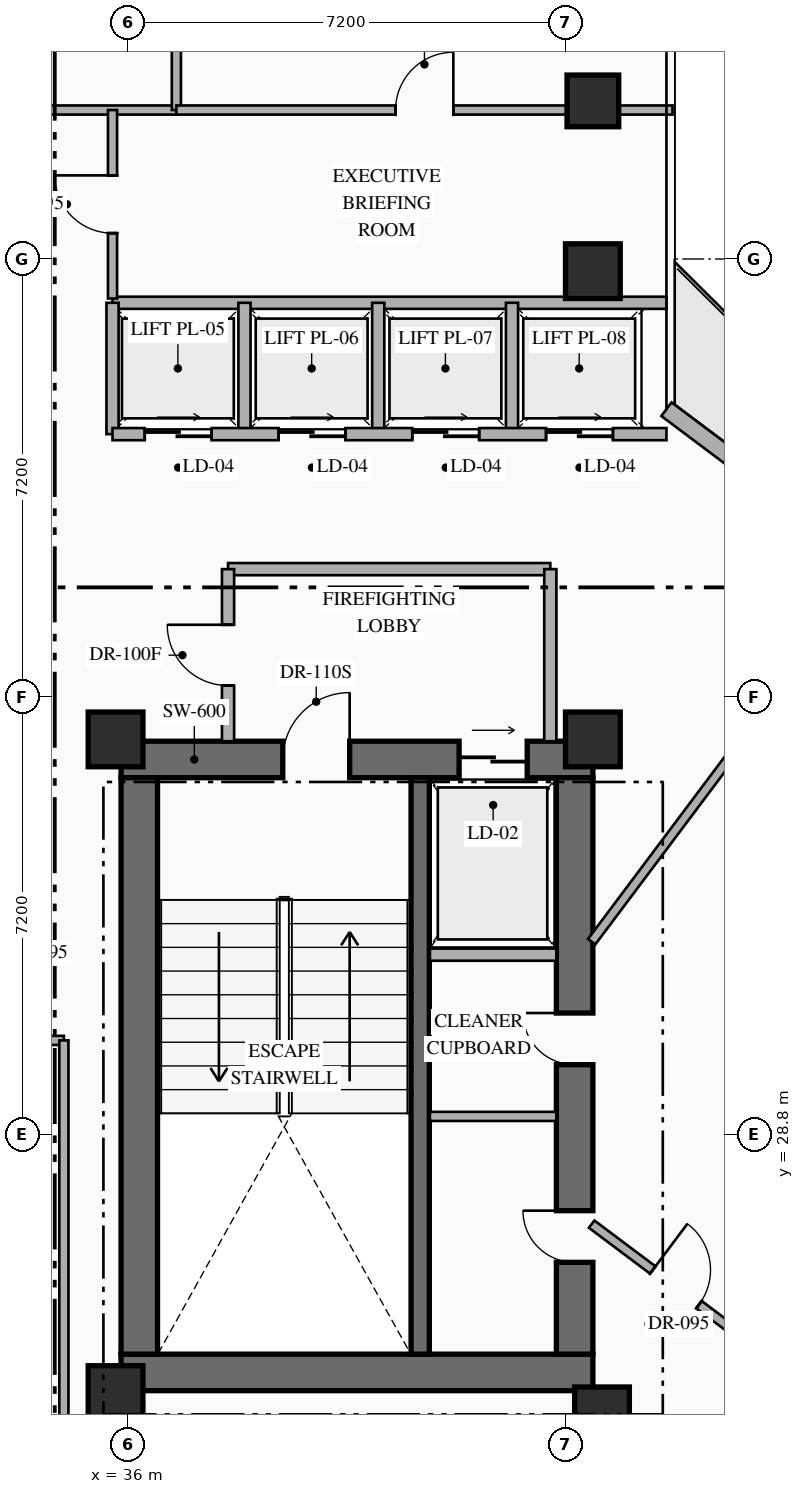
"""IFC4 building model, lengths in metres.
Left out: names, types, materials, properties, quantities, classifications, styles, units other than length and angle.
Written with IfcOpenShell. Run it as: python <this file> out.ifc"""

import sys

from ifc_helpers import new_model, si_unit, direction, frame, frame_2d, origin, origin_2d, place, context, subcontext, project, spatial, rectangle, hollow_rectangle, extrude, element, fill, save


model = new_model("IFC4")
c1 = context("Model", 3, precision=1e-05, world=origin(), true_north=direction((0.0, 1.0)))
c2 = subcontext(c1, "Body", "Model", "MODEL_VIEW")
j1 = project(units=[si_unit("LENGTHUNIT", "METRE"), si_unit("PLANEANGLEUNIT", "RADIAN")], contexts=[c1])
p1 = place(None, origin())
s1 = spatial("IfcSite", under=j1, at=p1, CompositionType="ELEMENT")
p2 = place(p1, origin())
s2 = spatial("IfcBuilding", under=s1, at=p2, CompositionType="ELEMENT")
p3 = place(p2, frame((0.0, 0.0, 142.05)))
s3 = spatial("IfcBuildingStorey", under=s2, at=p3, CompositionType="ELEMENT", Elevation=142.05)
p4 = place(p3, frame((35.89, 24.89, 0.0), z_axis=(0.0, 0.0, 1.0), x_axis=(1.0, 0.0, 0.0)))
e1 = element("IfcWall", 1, at=p4, inside=s3, PredefinedType="SHEAR", context=c2, shape_type="SweptSolid", body=[
    extrude(rectangle(XDim=7.76, YDim=0.6, at=frame_2d((3.88, 0.0))), origin(), (0.0, 0.0, 1.0), 3.6),
])
p5 = place(p3, frame((35.89, 34.97, 0.0), z_axis=(0.0, 0.0, 1.0), x_axis=(1.0, 0.0, 0.0)))
e2 = element("IfcWall", 2, at=p5, inside=s3, PredefinedType="SHEAR", context=c2, shape_type="SweptSolid", body=[
    extrude(rectangle(XDim=7.76, YDim=0.6, at=frame_2d((3.88, 0.0))), origin(), (0.0, 0.0, 1.0), 3.6),
])
p6 = place(p5, frame((2.66, 0.0, 0.0)))
e3 = element("IfcOpeningElement", 3, at=p6, cuts=e2, PredefinedType="OPENING", context=c2, shape_type="SweptSolid", body=[
    extrude(rectangle(XDim=1.1, YDim=2.2, at=frame_2d((0.55, 1.1))), frame((0.0, 0.31, 0.0), z_axis=(0.0, -1.0, 0.0), x_axis=(1.0, 0.0, 0.0)), (0.0, 0.0, 1.0), 0.62),
])
p7 = place(p5, frame((5.56, 0.0, 0.0)))
e4 = element("IfcOpeningElement", 4, at=p7, cuts=e2, PredefinedType="OPENING", context=c2, shape_type="SweptSolid", body=[
    extrude(rectangle(XDim=1.12, YDim=2.15, at=frame_2d((0.56, 1.075))), frame((0.0, 0.31, 0.0), z_axis=(0.0, -1.0, 0.0), x_axis=(1.0, 0.0, 0.0)), (0.0, 0.0, 1.0), 0.62),
])
p8 = place(p3, frame((36.19, 25.19, 0.0), z_axis=(0.0, 0.0, 1.0), x_axis=(0.0, 1.0, 0.0)))
e5 = element("IfcWall", 5, at=p8, inside=s3, PredefinedType="SHEAR", context=c2, shape_type="SweptSolid", body=[
    extrude(rectangle(XDim=9.48, YDim=0.6, at=frame_2d((4.74, 0.0))), origin(), (0.0, 0.0, 1.0), 3.6),
])
p9 = place(p3, frame((43.35, 25.19, 0.0), z_axis=(0.0, 0.0, 1.0), x_axis=(0.0, 1.0, 0.0)))
e6 = element("IfcWall", 6, at=p9, inside=s3, PredefinedType="SHEAR", context=c2, shape_type="SweptSolid", body=[
    extrude(rectangle(XDim=9.48, YDim=0.6, at=frame_2d((4.74, 0.0))), origin(), (0.0, 0.0, 1.0), 3.6),
])
p10 = place(p9, frame((1.51, 0.0, 0.0)))
e7 = element("IfcOpeningElement", 7, at=p10, cuts=e6, PredefinedType="OPENING", context=c2, shape_type="SweptSolid", body=[
    extrude(rectangle(XDim=0.85, YDim=2.08, at=frame_2d((0.425, 1.04))), frame((0.0, 0.31, 0.0), z_axis=(0.0, -1.0, 0.0), x_axis=(1.0, 0.0, 0.0)), (0.0, 0.0, 1.0), 0.62),
])
p11 = place(p9, frame((4.76, 0.0, 0.0)))
e8 = element("IfcOpeningElement", 8, at=p11, cuts=e6, PredefinedType="OPENING", context=c2, shape_type="SweptSolid", body=[
    extrude(rectangle(XDim=0.85, YDim=2.08, at=frame_2d((0.425, 1.04))), frame((0.0, 0.31, 0.0), z_axis=(0.0, -1.0, 0.0), x_axis=(1.0, 0.0, 0.0)), (0.0, 0.0, 1.0), 0.62),
])
p12 = place(p3, frame((40.81, 25.19, 0.0), z_axis=(0.0, 0.0, 1.0), x_axis=(0.0, 1.0, 0.0)))
e9 = element("IfcWall", 9, at=p12, inside=s3, PredefinedType="SHEAR", context=c2, shape_type="SweptSolid", body=[
    extrude(rectangle(XDim=9.48, YDim=0.3, at=frame_2d((4.74, 0.0))), origin(), (0.0, 0.0, 1.0), 3.6),
])
for number, where, z_axis, x_axis in (
    (10, (35.8, 24.55, 0.0), (0.0, 0.0, 1.0), (1.0, 0.0, 0.0)),
    (11, (43.8, 24.2, 0.0), (0.0, 0.0, 1.0), (1.0, 0.0, 0.0)),
    (12, (35.8, 35.3, 0.0), (0.0, 0.0, 1.0), (1.0, 0.0, 0.0)),
    (13, (43.65, 35.3, 0.0), (0.0, 0.0, 1.0), (1.0, 0.0, 0.0)),
    (14, (43.65, 43.0, 0.0), (0.0, 0.0, 1.0), (1.0, 0.0, 0.0)),
):
    element("IfcColumn", number, at=place(p3, frame(where, z_axis=z_axis, x_axis=x_axis)), inside=s3, PredefinedType="COLUMN", context=c2, shape_type="SweptSolid", body=[
        extrude(rectangle(XDim=0.9, YDim=0.9, at=origin_2d()), origin(), (0.0, 0.0, 1.0), 3.6),
    ])
p13 = place(p3, frame((43.65, 45.8, 0.0), z_axis=(0.0, 0.0, 1.0), x_axis=(1.0, 0.0, 0.0)))
e15 = element("IfcColumn", 15, at=p13, inside=s3, PredefinedType="COLUMN", context=c2, shape_type="SweptSolid", body=[
    extrude(hollow_rectangle(XDim=0.85, YDim=0.85, WallThickness=0.032, at=origin_2d()), origin(), (0.0, 0.0, 1.0), 3.6),
])
p14 = place(p3, frame((44.86, 40.73, 0.0), z_axis=(0.0, 0.0, 1.0), x_axis=(0.800007624502, -0.599989833863, 0.0)))
e16 = element("IfcWall", 16, at=p14, inside=s3, PredefinedType="STANDARD", context=c2, shape_type="SweptSolid", body=[
    extrude(rectangle(XDim=19.212, YDim=0.28, at=frame_2d((9.606, 0.0))), origin(), (0.0, 0.0, 1.0), 3.35),
])
p15 = place(p14, frame((1.755, 0.0, 0.0)))
e17 = element("IfcOpeningElement", 17, at=p15, cuts=e16, PredefinedType="OPENING", context=c2, shape_type="SweptSolid", body=[
    extrude(rectangle(XDim=1.1, YDim=2.2, at=frame_2d((0.55, 1.1))), frame((0.0, 0.15, 0.0), z_axis=(0.0, -1.0, 0.0), x_axis=(1.0, 0.0, 0.0)), (0.0, 0.0, 1.0), 0.3),
])
p16 = place(p14, frame((13.509, 0.0, 0.85)))
e18 = element("IfcOpeningElement", 18, at=p16, cuts=e16, PredefinedType="OPENING", context=c2, shape_type="SweptSolid", body=[
    extrude(rectangle(XDim=1.8, YDim=2.1, at=frame_2d((0.9, 1.05))), frame((0.0, 0.15, 0.0), z_axis=(0.0, -1.0, 0.0), x_axis=(1.0, 0.0, 0.0)), (0.0, 0.0, 1.0), 0.3),
])
p17 = place(p3, frame((40.97, 31.76, 0.0), z_axis=(0.0, 0.0, 1.0), x_axis=(1.0, 0.0, 0.0)))
e19 = element("IfcWall", 19, at=p17, inside=s3, PredefinedType="STANDARD", context=c2, shape_type="SweptSolid", body=[
    extrude(rectangle(XDim=2.08, YDim=0.2, at=frame_2d((1.04, 0.0))), origin(), (0.0, 0.0, 1.0), 3.35),
])
p18 = place(p3, frame((40.97, 29.1, 0.0), z_axis=(0.0, 0.0, 1.0), x_axis=(1.0, 0.0, 0.0)))
e20 = element("IfcWall", 20, at=p18, inside=s3, PredefinedType="PARTITIONING", context=c2, shape_type="SweptSolid", body=[
    extrude(rectangle(XDim=2.08, YDim=0.15, at=frame_2d((1.04, 0.0))), origin(), (0.0, 0.0, 1.0), 3.35),
])
p19 = place(p3, frame((37.65, 38.1, 0.0), z_axis=(0.0, 0.0, 1.0), x_axis=(1.0, 0.0, 0.0)))
e21 = element("IfcWall", 21, at=p19, inside=s3, PredefinedType="STANDARD", context=c2, shape_type="SweptSolid", body=[
    extrude(rectangle(XDim=5.3, YDim=0.2, at=frame_2d((2.65, 0.0))), origin(), (0.0, 0.0, 1.0), 3.35),
])
p20 = place(p3, frame((42.95, 35.27, 0.0), z_axis=(0.0, 0.0, 1.0), x_axis=(0.0, 1.0, 0.0)))
e22 = element("IfcWall", 22, at=p20, inside=s3, PredefinedType="STANDARD", context=c2, shape_type="SweptSolid", body=[
    extrude(rectangle(XDim=2.83, YDim=0.2, at=frame_2d((1.415, 0.0))), origin(), (0.0, 0.0, 1.0), 3.35),
])
p21 = place(p3, frame((37.65, 35.27, 0.0), z_axis=(0.0, 0.0, 1.0), x_axis=(0.0, 1.0, 0.0)))
e23 = element("IfcWall", 23, at=p21, inside=s3, PredefinedType="STANDARD", context=c2, shape_type="SweptSolid", body=[
    extrude(rectangle(XDim=2.83, YDim=0.2, at=frame_2d((1.415, 0.0))), origin(), (0.0, 0.0, 1.0), 3.35),
])
p22 = place(p21, frame((0.915, 0.0, 0.0)))
e24 = element("IfcOpeningElement", 24, at=p22, cuts=e23, PredefinedType="OPENING", context=c2, shape_type="SweptSolid", body=[
    extrude(rectangle(XDim=1.0, YDim=2.2, at=frame_2d((0.5, 1.1))), frame((0.0, 0.11, 0.0), z_axis=(0.0, -1.0, 0.0), x_axis=(1.0, 0.0, 0.0)), (0.0, 0.0, 1.0), 0.22),
])
p23 = place(p3, frame((35.75, 42.48, 0.0), z_axis=(0.0, 0.0, 1.0), x_axis=(1.0, 0.0, 0.0)))
e25 = element("IfcWall", 25, at=p23, inside=s3, PredefinedType="STANDARD", context=c2, shape_type="SweptSolid", body=[
    extrude(rectangle(XDim=9.11, YDim=0.2, at=frame_2d((4.555, 0.0))), origin(), (0.0, 0.0, 1.0), 3.35),
])
for number, where, z_axis, x_axis in (
    (26, (35.75, 40.32, 0.0), (0.0, 0.0, 1.0), (0.0, 1.0, 0.0)),
    (27, (37.92, 40.32, 0.0), (0.0, 0.0, 1.0), (0.0, 1.0, 0.0)),
    (28, (40.12, 40.32, 0.0), (0.0, 0.0, 1.0), (0.0, 1.0, 0.0)),
    (29, (42.32, 40.32, 0.0), (0.0, 0.0, 1.0), (0.0, 1.0, 0.0)),
):
    element("IfcWall", number, at=place(p3, frame(where, z_axis=z_axis, x_axis=x_axis)), inside=s3, PredefinedType="STANDARD", context=c2, shape_type="SweptSolid", body=[
        extrude(rectangle(XDim=2.16, YDim=0.2, at=frame_2d((1.08, 0.0))), origin(), (0.0, 0.0, 1.0), 3.35),
    ])
p24 = place(p3, frame((35.75, 40.32, 0.0), z_axis=(0.0, 0.0, 1.0), x_axis=(1.0, 0.0, 0.0)))
e30 = element("IfcWall", 30, at=p24, inside=s3, PredefinedType="STANDARD", context=c2, shape_type="SweptSolid", body=[
    extrude(rectangle(XDim=9.11, YDim=0.2, at=frame_2d((4.555, 0.0))), origin(), (0.0, 0.0, 1.0), 3.35),
])
p25 = place(p24, frame((0.53, 0.0, 0.0)))
e31 = element("IfcOpeningElement", 31, at=p25, cuts=e30, PredefinedType="OPENING", context=c2, shape_type="SweptSolid", body=[
    extrude(rectangle(XDim=1.1, YDim=2.18, at=frame_2d((0.55, 1.09))), frame((0.0, 0.11, 0.0), z_axis=(0.0, -1.0, 0.0), x_axis=(1.0, 0.0, 0.0)), (0.0, 0.0, 1.0), 0.22),
])
p26 = place(p24, frame((2.73, 0.0, 0.0)))
e32 = element("IfcOpeningElement", 32, at=p26, cuts=e30, PredefinedType="OPENING", context=c2, shape_type="SweptSolid", body=[
    extrude(rectangle(XDim=1.1, YDim=2.18, at=frame_2d((0.55, 1.09))), frame((0.0, 0.11, 0.0), z_axis=(0.0, -1.0, 0.0), x_axis=(1.0, 0.0, 0.0)), (0.0, 0.0, 1.0), 0.22),
])
p27 = place(p24, frame((4.93, 0.0, 0.0)))
e33 = element("IfcOpeningElement", 33, at=p27, cuts=e30, PredefinedType="OPENING", context=c2, shape_type="SweptSolid", body=[
    extrude(rectangle(XDim=1.1, YDim=2.18, at=frame_2d((0.55, 1.09))), frame((0.0, 0.11, 0.0), z_axis=(0.0, -1.0, 0.0), x_axis=(1.0, 0.0, 0.0)), (0.0, 0.0, 1.0), 0.22),
])
p28 = place(p24, frame((7.13, 0.0, 0.0)))
e34 = element("IfcOpeningElement", 34, at=p28, cuts=e30, PredefinedType="OPENING", context=c2, shape_type="SweptSolid", body=[
    extrude(rectangle(XDim=1.1, YDim=2.18, at=frame_2d((0.55, 1.09))), frame((0.0, 0.11, 0.0), z_axis=(0.0, -1.0, 0.0), x_axis=(1.0, 0.0, 0.0)), (0.0, 0.0, 1.0), 0.22),
])
p29 = place(p3, frame((30.5, 30.35, 0.0), z_axis=(0.0, 0.0, 1.0), x_axis=(1.0, 0.0, 0.0)))
e35 = element("IfcWall", 35, at=p29, inside=s3, PredefinedType="PARTITIONING", context=c2, shape_type="SweptSolid", body=[
    extrude(rectangle(XDim=4.45, YDim=0.15, at=frame_2d((2.225, 0.0))), origin(), (0.0, 0.0, 1.0), 3.35),
])
p30 = place(p29, frame((2.846, 0.0, 0.0)))
e36 = element("IfcOpeningElement", 36, at=p30, cuts=e35, PredefinedType="OPENING", context=c2, shape_type="SweptSolid", body=[
    extrude(rectangle(XDim=0.95, YDim=2.15, at=frame_2d((0.475, 1.075))), frame((0.0, 0.085, 0.0), z_axis=(0.0, -1.0, 0.0), x_axis=(1.0, 0.0, 0.0)), (0.0, 0.0, 1.0), 0.17),
])
p31 = place(p3, frame((34.95, 23.2, 0.0), z_axis=(0.0, 0.0, 1.0), x_axis=(0.0, 1.0, 0.0)))
e37 = element("IfcWall", 37, at=p31, inside=s3, PredefinedType="PARTITIONING", context=c2, shape_type="SweptSolid", body=[
    extrude(rectangle(XDim=7.15, YDim=0.15, at=frame_2d((3.575, 0.0))), origin(), (0.0, 0.0, 1.0), 3.35),
])
p32 = place(p3, frame((28.4, 45.65, 0.0), z_axis=(0.0, 0.0, 1.0), x_axis=(1.0, 0.0, 0.0)))
e38 = element("IfcWall", 38, at=p32, inside=s3, PredefinedType="PARTITIONING", context=c2, shape_type="SweptSolid", body=[
    extrude(rectangle(XDim=8.4, YDim=0.15, at=frame_2d((4.2, 0.0))), origin(), (0.0, 0.0, 1.0), 2.695),
])
p33 = place(p32, frame((2.052, 0.0, 0.0)))
e39 = element("IfcOpeningElement", 39, at=p33, cuts=e38, PredefinedType="OPENING", context=c2, shape_type="SweptSolid", body=[
    extrude(rectangle(XDim=0.95, YDim=2.15, at=frame_2d((0.475, 1.075))), frame((0.0, 0.085, 0.0), z_axis=(0.0, -1.0, 0.0), x_axis=(1.0, 0.0, 0.0)), (0.0, 0.0, 1.0), 0.17),
])
p34 = place(p3, frame((36.8, 45.65, 0.0), z_axis=(0.0, 0.0, 1.0), x_axis=(0.0, 1.0, 0.0)))
e40 = element("IfcWall", 40, at=p34, inside=s3, PredefinedType="PARTITIONING", context=c2, shape_type="SweptSolid", body=[
    extrude(rectangle(XDim=4.71, YDim=0.15, at=frame_2d((2.355, 0.0))), origin(), (0.0, 0.0, 1.0), 3.35),
])
p35 = place(p3, frame((36.8, 45.65, 0.0), z_axis=(0.0, 0.0, 1.0), x_axis=(1.0, 0.0, 0.0)))
e41 = element("IfcWall", 41, at=p35, inside=s3, PredefinedType="PARTITIONING", context=c2, shape_type="SweptSolid", body=[
    extrude(rectangle(XDim=8.16, YDim=0.15, at=frame_2d((4.08, 0.0))), origin(), (0.0, 0.0, 1.0), 2.695),
])
p36 = place(p35, frame((3.605, 0.0, 0.0)))
e42 = element("IfcOpeningElement", 42, at=p36, cuts=e41, PredefinedType="OPENING", context=c2, shape_type="SweptSolid", body=[
    extrude(rectangle(XDim=0.95, YDim=2.15, at=frame_2d((0.475, 1.075))), frame((0.0, 0.085, 0.0), z_axis=(0.0, -1.0, 0.0), x_axis=(1.0, 0.0, 0.0)), (0.0, 0.0, 1.0), 0.17),
])
p37 = place(p3, frame((45.32, 22.56, 0.0), z_axis=(0.0, 0.0, 1.0), x_axis=(0.6, 0.8, 0.0)))
e43 = element("IfcWall", 43, at=p37, inside=s3, PredefinedType="PARTITIONING", context=c2, shape_type="SweptSolid", body=[
    extrude(rectangle(XDim=7.4, YDim=0.15, at=frame_2d((3.7, 0.0))), origin(), (0.0, 0.0, 1.0), 3.35),
])
p38 = place(p37, frame((3.51, 0.0, 0.0)))
e44 = element("IfcOpeningElement", 44, at=p38, cuts=e43, PredefinedType="OPENING", context=c2, shape_type="SweptSolid", body=[
    extrude(rectangle(XDim=0.95, YDim=2.15, at=frame_2d((0.475, 1.075))), frame((0.0, 0.085, 0.0), z_axis=(0.0, -1.0, 0.0), x_axis=(1.0, 0.0, 0.0)), (0.0, 0.0, 1.0), 0.17),
])
p39 = place(p3, frame((43.63, 27.328, 0.0), z_axis=(0.0, 0.0, 1.0), x_axis=(0.799972182084, -0.600037088764, 0.0)))
e45 = element("IfcWall", 45, at=p39, inside=s3, PredefinedType="PARTITIONING", context=c2, shape_type="SweptSolid", body=[
    extrude(rectangle(XDim=4.213, YDim=0.15, at=frame_2d((2.106, 0.0))), origin(), (0.0, 0.0, 1.0), 3.045),
])
p40 = place(p39, frame((1.256, 0.0, 0.0)))
e46 = element("IfcOpeningElement", 46, at=p40, cuts=e45, PredefinedType="OPENING", context=c2, shape_type="SweptSolid", body=[
    extrude(rectangle(XDim=0.95, YDim=2.15, at=frame_2d((0.475, 1.075))), frame((0.0, 0.085, 0.0), z_axis=(0.0, -1.0, 0.0), x_axis=(1.0, 0.0, 0.0)), (0.0, 0.0, 1.0), 0.17),
])
p41 = place(p3, frame((43.63, 31.973, 0.0), z_axis=(0.0, 0.0, 1.0), x_axis=(0.599975099311, 0.800018674911, 0.0)))
e47 = element("IfcWall", 47, at=p41, inside=s3, PredefinedType="PARTITIONING", context=c2, shape_type="SweptSolid", body=[
    extrude(rectangle(XDim=7.844, YDim=0.15, at=frame_2d((3.922, 0.0))), origin(), (0.0, 0.0, 1.0), 3.35),
])
p42 = place(p3, frame((35.75, 42.55, 0.0), z_axis=(0.0, 0.0, 1.0), x_axis=(0.0, 1.0, 0.0)))
e48 = element("IfcWall", 48, at=p42, inside=s3, PredefinedType="PARTITIONING", context=c2, shape_type="SweptSolid", body=[
    extrude(rectangle(XDim=3.1, YDim=0.15, at=frame_2d((1.55, 0.0))), origin(), (0.0, 0.0, 1.0), 3.35),
])
p43 = place(p42, frame((1.075, 0.0, 0.0)))
e49 = element("IfcOpeningElement", 49, at=p43, cuts=e48, PredefinedType="OPENING", context=c2, shape_type="SweptSolid", body=[
    extrude(rectangle(XDim=0.95, YDim=2.15, at=frame_2d((0.475, 1.075))), frame((0.0, 0.085, 0.0), z_axis=(0.0, -1.0, 0.0), x_axis=(1.0, 0.0, 0.0)), (0.0, 0.0, 1.0), 0.17),
])
p44 = place(p3, frame((27.91, 26.68, 0.0), z_axis=(0.0, 0.0, 1.0), x_axis=(0.800005938517, -0.599992081896, 0.0)))
e50 = element("IfcWall", 50, at=p44, inside=s3, PredefinedType="PARTITIONING", context=c2, shape_type="SweptSolid", body=[
    extrude(rectangle(XDim=14.8, YDim=0.15, at=frame_2d((7.4, 0.0))), origin(), (0.0, 0.0, 1.0), 3.35),
])
p45 = place(p44, frame((9.281, 0.0, 0.0)))
e51 = element("IfcOpeningElement", 51, at=p45, cuts=e50, PredefinedType="OPENING", context=c2, shape_type="SweptSolid", body=[
    extrude(rectangle(XDim=0.95, YDim=2.15, at=frame_2d((0.475, 1.075))), frame((0.0, 0.085, 0.0), z_axis=(0.0, -1.0, 0.0), x_axis=(1.0, 0.0, 0.0)), (0.0, 0.0, 1.0), 0.17),
])
p46 = place(p6, origin())
e52 = element("IfcDoor", 52, at=p46, inside=s3, OperationType="SINGLE_SWING_RIGHT", PredefinedType="DOOR", context=c2, shape_type="SweptSolid", body=[
    extrude(rectangle(XDim=1.1, YDim=2.2, at=frame_2d((0.55, 1.1))), frame((0.0, 0.025, 0.0), z_axis=(0.0, -1.0, 0.0), x_axis=(1.0, 0.0, 0.0)), (0.0, 0.0, 1.0), 0.05),
])
fill(e3, e52)
p47 = place(p7, origin())
e53 = element("IfcDoor", 53, at=p47, inside=s3, OperationType="SLIDING_TO_RIGHT", PredefinedType="USERDEFINED", context=c2, shape_type="SweptSolid", body=[
    extrude(rectangle(XDim=1.12, YDim=2.15, at=frame_2d((0.56, 1.075))), frame((0.0, 0.025, 0.0), z_axis=(0.0, -1.0, 0.0), x_axis=(1.0, 0.0, 0.0)), (0.0, 0.0, 1.0), 0.05),
])
fill(e4, e53)
p48 = place(p10, origin())
e54 = element("IfcDoor", 54, at=p48, inside=s3, OperationType="SINGLE_SWING_RIGHT", PredefinedType="DOOR", context=c2, shape_type="SweptSolid", body=[
    extrude(rectangle(XDim=0.85, YDim=2.08, at=frame_2d((0.425, 1.04))), frame((0.0, 0.025, 0.0), z_axis=(0.0, -1.0, 0.0), x_axis=(1.0, 0.0, 0.0)), (0.0, 0.0, 1.0), 0.05),
])
fill(e7, e54)
p49 = place(p11, origin())
e55 = element("IfcDoor", 55, at=p49, inside=s3, OperationType="SINGLE_SWING_RIGHT", PredefinedType="DOOR", context=c2, shape_type="SweptSolid", body=[
    extrude(rectangle(XDim=0.85, YDim=2.08, at=frame_2d((0.425, 1.04))), frame((0.0, 0.025, 0.0), z_axis=(0.0, -1.0, 0.0), x_axis=(1.0, 0.0, 0.0)), (0.0, 0.0, 1.0), 0.05),
])
fill(e8, e55)
p50 = place(p22, origin())
e56 = element("IfcDoor", 56, at=p50, inside=s3, OperationType="SINGLE_SWING_RIGHT", PredefinedType="DOOR", context=c2, shape_type="SweptSolid", body=[
    extrude(rectangle(XDim=1.0, YDim=2.2, at=frame_2d((0.5, 1.1))), frame((0.0, 0.025, 0.0), z_axis=(0.0, -1.0, 0.0), x_axis=(1.0, 0.0, 0.0)), (0.0, 0.0, 1.0), 0.05),
])
fill(e24, e56)
p51 = place(p25, origin())
e57 = element("IfcDoor", 57, at=p51, inside=s3, OperationType="SLIDING_TO_RIGHT", PredefinedType="USERDEFINED", context=c2, shape_type="SweptSolid", body=[
    extrude(rectangle(XDim=1.1, YDim=2.18, at=frame_2d((0.55, 1.09))), frame((0.0, 0.025, 0.0), z_axis=(0.0, -1.0, 0.0), x_axis=(1.0, 0.0, 0.0)), (0.0, 0.0, 1.0), 0.05),
])
fill(e31, e57)
p52 = place(p26, origin())
e58 = element("IfcDoor", 58, at=p52, inside=s3, OperationType="SLIDING_TO_RIGHT", PredefinedType="USERDEFINED", context=c2, shape_type="SweptSolid", body=[
    extrude(rectangle(XDim=1.1, YDim=2.18, at=frame_2d((0.55, 1.09))), frame((0.0, 0.025, 0.0), z_axis=(0.0, -1.0, 0.0), x_axis=(1.0, 0.0, 0.0)), (0.0, 0.0, 1.0), 0.05),
])
fill(e32, e58)
p53 = place(p27, origin())
e59 = element("IfcDoor", 59, at=p53, inside=s3, OperationType="SLIDING_TO_RIGHT", PredefinedType="USERDEFINED", context=c2, shape_type="SweptSolid", body=[
    extrude(rectangle(XDim=1.1, YDim=2.18, at=frame_2d((0.55, 1.09))), frame((0.0, 0.025, 0.0), z_axis=(0.0, -1.0, 0.0), x_axis=(1.0, 0.0, 0.0)), (0.0, 0.0, 1.0), 0.05),
])
fill(e33, e59)
p54 = place(p28, origin())
e60 = element("IfcDoor", 60, at=p54, inside=s3, OperationType="SLIDING_TO_RIGHT", PredefinedType="USERDEFINED", context=c2, shape_type="SweptSolid", body=[
    extrude(rectangle(XDim=1.1, YDim=2.18, at=frame_2d((0.55, 1.09))), frame((0.0, 0.025, 0.0), z_axis=(0.0, -1.0, 0.0), x_axis=(1.0, 0.0, 0.0)), (0.0, 0.0, 1.0), 0.05),
])
fill(e34, e60)
p55 = place(p36, origin())
e61 = element("IfcDoor", 61, at=p55, inside=s3, OperationType="SINGLE_SWING_RIGHT", PredefinedType="DOOR", context=c2, shape_type="SweptSolid", body=[
    extrude(rectangle(XDim=0.95, YDim=2.15, at=frame_2d((0.475, 1.075))), frame((0.0, 0.025, 0.0), z_axis=(0.0, -1.0, 0.0), x_axis=(1.0, 0.0, 0.0)), (0.0, 0.0, 1.0), 0.05),
])
fill(e42, e61)
p56 = place(p40, origin())
e62 = element("IfcDoor", 62, at=p56, inside=s3, OperationType="SINGLE_SWING_LEFT", PredefinedType="DOOR", context=c2, shape_type="SweptSolid", body=[
    extrude(rectangle(XDim=0.95, YDim=2.15, at=frame_2d((0.475, 1.075))), frame((0.0, 0.025, 0.0), z_axis=(0.0, -1.0, 0.0), x_axis=(1.0, 0.0, 0.0)), (0.0, 0.0, 1.0), 0.05),
])
fill(e46, e62)
p57 = place(p43, origin())
e63 = element("IfcDoor", 63, at=p57, inside=s3, OperationType="SINGLE_SWING_RIGHT", PredefinedType="DOOR", context=c2, shape_type="SweptSolid", body=[
    extrude(rectangle(XDim=0.95, YDim=2.15, at=frame_2d((0.475, 1.075))), frame((0.0, 0.025, 0.0), z_axis=(0.0, -1.0, 0.0), x_axis=(1.0, 0.0, 0.0)), (0.0, 0.0, 1.0), 0.05),
])
fill(e49, e63)
save(model, sys.argv[1])
